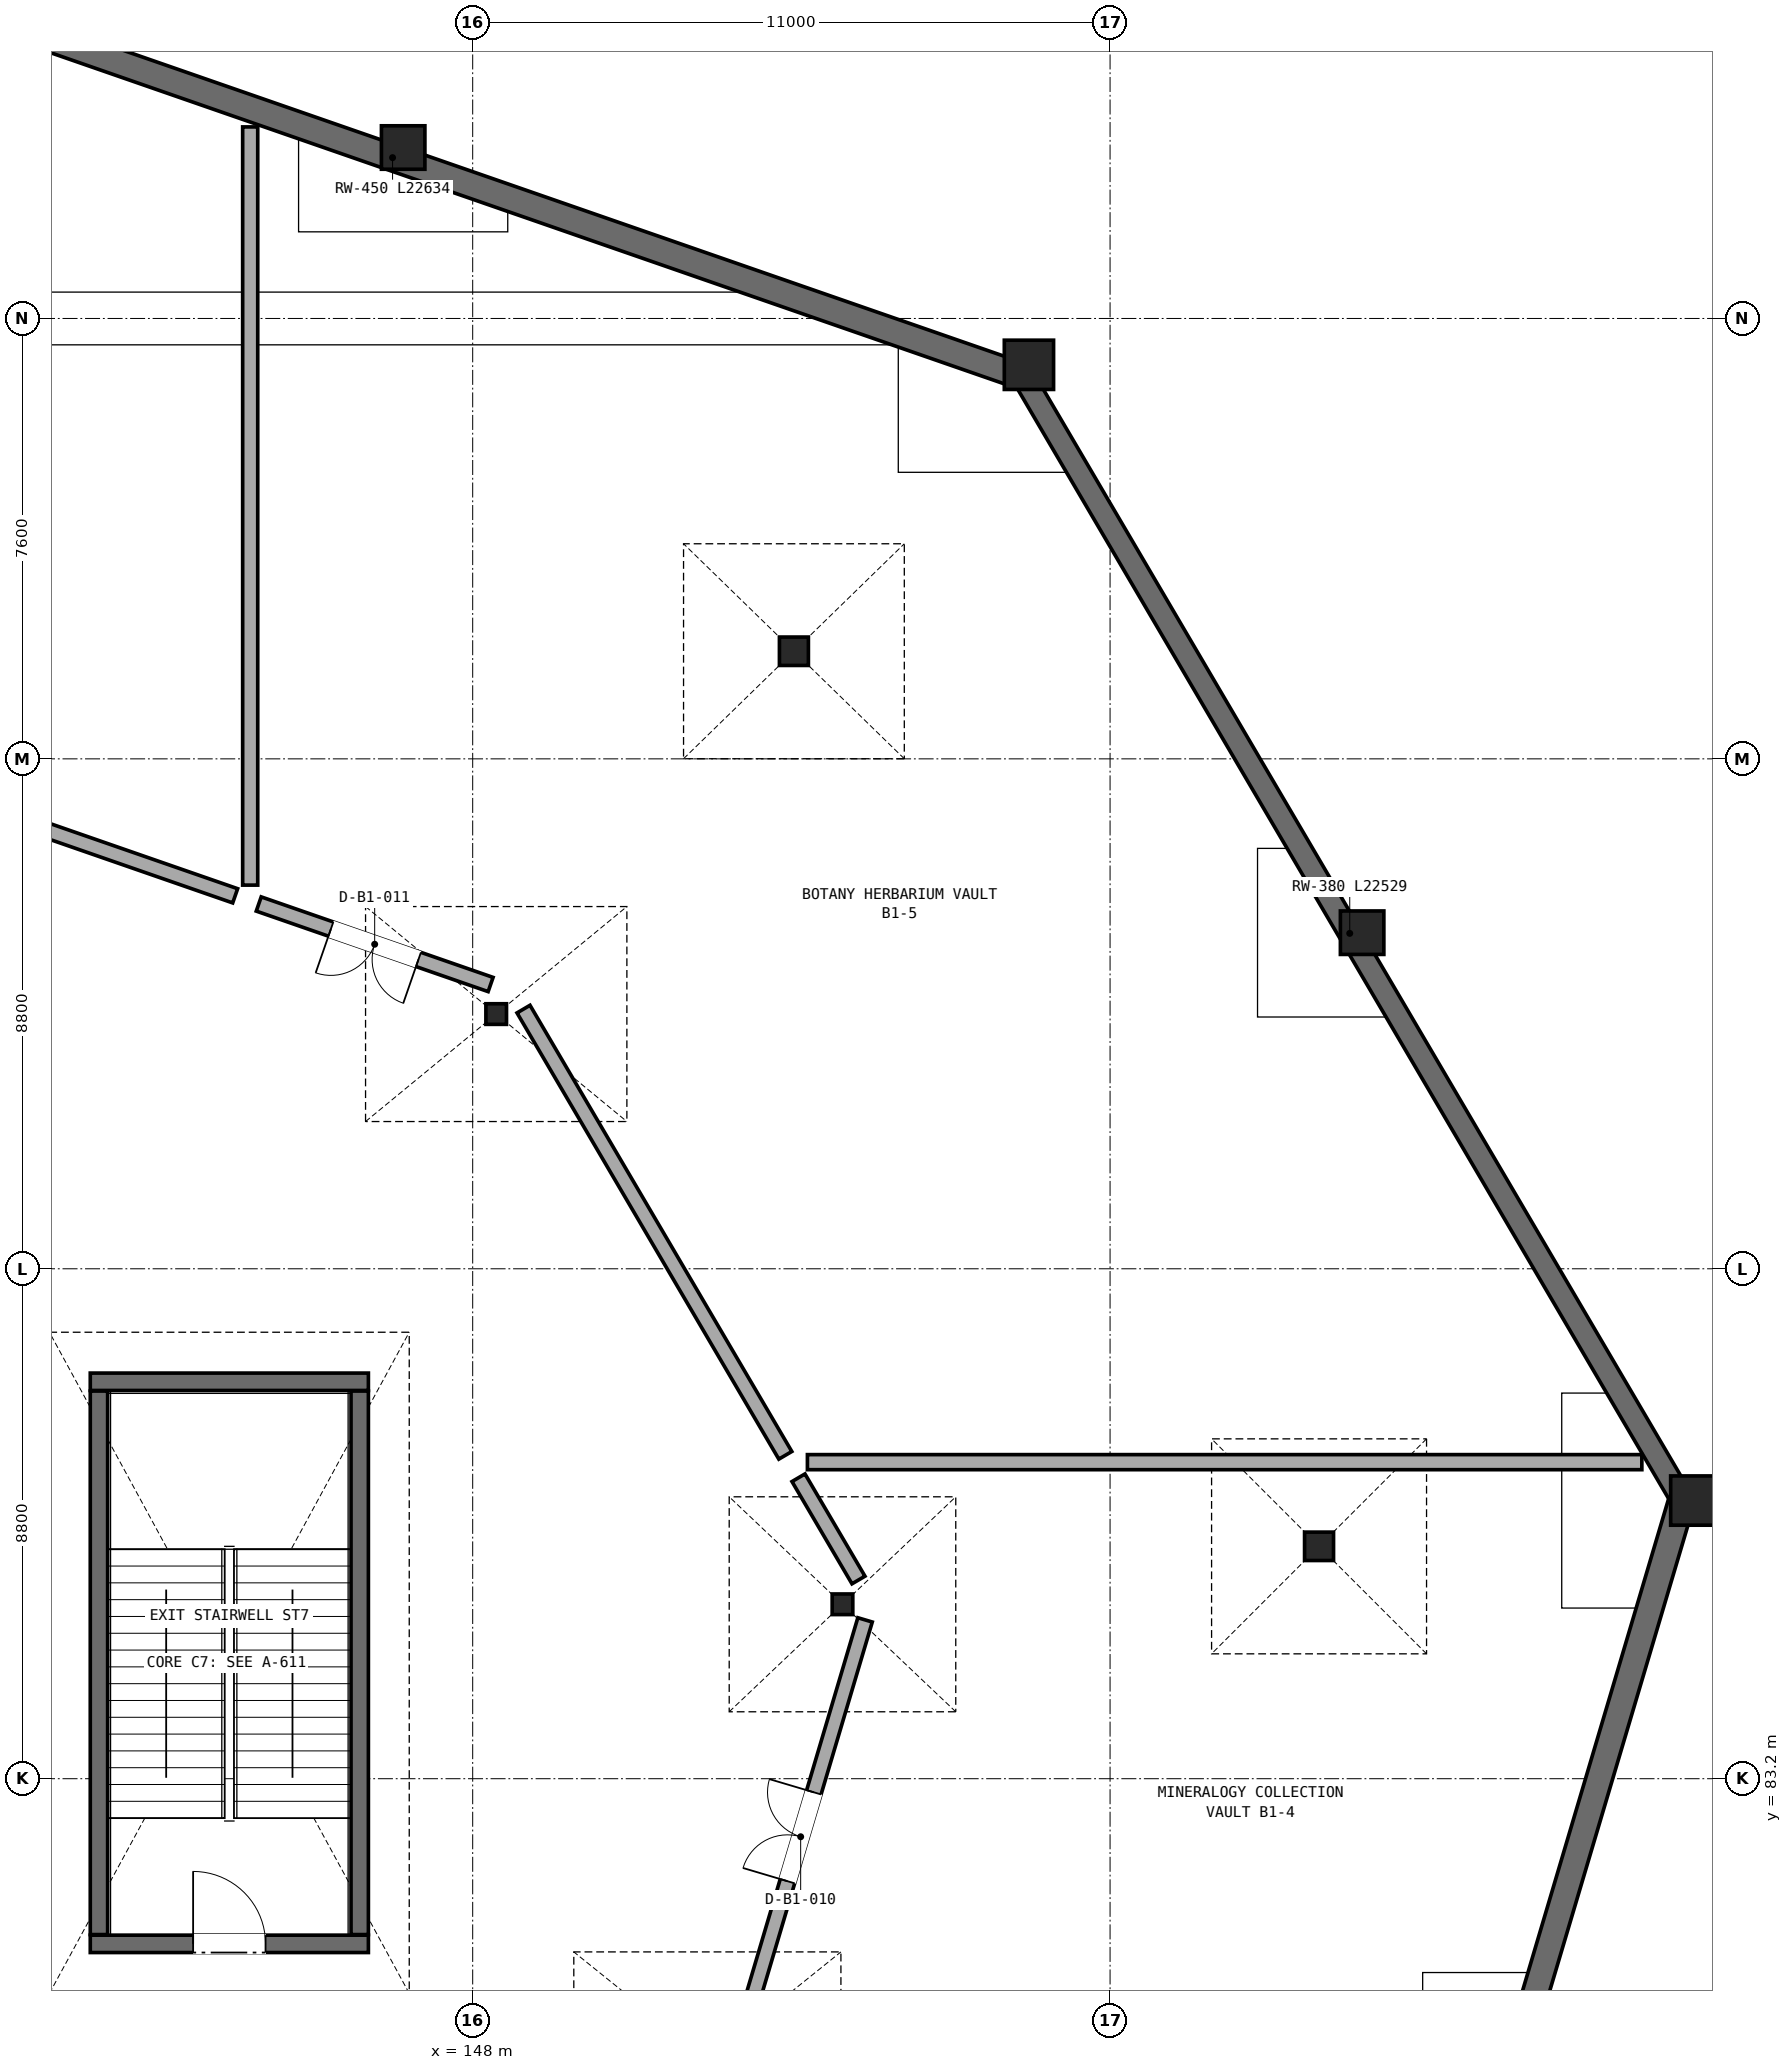
"""IFC4 building model, lengths in metres.
Left out: names, types, materials, properties, quantities, classifications, styles, units other than length and angle.
Written with IfcOpenShell. Run it as: python <this file> out.ifc"""

import sys

from ifc_helpers import new_model, si_unit, direction, frame, frame_2d, origin, origin_2d, place, context, subcontext, project, spatial, rectangle, hollow_circle, i_section, extrude, element, fill, save


model = new_model("IFC4")
c1 = context("Model", 3, precision=1e-05, world=origin(), true_north=direction((0.0, 1.0)))
c2 = subcontext(c1, "Body", "Model", "MODEL_VIEW")
j1 = project(units=[si_unit("LENGTHUNIT", "METRE"), si_unit("PLANEANGLEUNIT", "RADIAN")], contexts=[c1])
p1 = place(None, origin())
s1 = spatial("IfcSite", under=j1, at=p1, CompositionType="ELEMENT")
p2 = place(p1, origin())
s2 = spatial("IfcBuilding", under=s1, at=p2, CompositionType="ELEMENT")
p3 = place(p2, frame((0.0, 0.0, -5.4)))
s3 = spatial("IfcBuildingStorey", under=s2, at=p3, CompositionType="ELEMENT", Elevation=-5.4)
p4 = place(p3, frame((169.1, 88.0, 0.0), z_axis=(0.0, 0.0, 1.0), x_axis=(1.0, 0.0, 0.0)))
e1 = element("IfcColumn", 1, at=p4, inside=s3, PredefinedType="COLUMN", context=c2, shape_type="SweptSolid", body=[
    extrude(rectangle(XDim=0.85, YDim=0.85, at=origin_2d()), origin(), (0.0, 0.0, 1.0), 5.4),
])
p5 = place(p3, frame((163.35, 97.8, 0.0), z_axis=(0.0, 0.0, 1.0), x_axis=(1.0, 0.0, 0.0)))
e2 = element("IfcColumn", 2, at=p5, inside=s3, PredefinedType="COLUMN", context=c2, shape_type="SweptSolid", body=[
    extrude(rectangle(XDim=0.75, YDim=0.75, at=origin_2d()), origin(), (0.0, 0.0, 1.0), 5.4),
])
p6 = place(p3, frame((162.607, 87.21, 0.0), z_axis=(0.0, 0.0, 1.0), x_axis=(1.0, 0.0, 0.0)))
e3 = element("IfcColumn", 3, at=p6, inside=s3, PredefinedType="COLUMN", context=c2, shape_type="SweptSolid", body=[
    extrude(i_section(OverallWidth=0.5, OverallDepth=0.49, WebThickness=0.028, FlangeThickness=0.04, at=origin_2d()), origin(), (0.0, 0.0, 1.0), 5.4),
])
p7 = place(p3, frame((154.382, 86.21, 0.0), z_axis=(0.0, 0.0, 1.0), x_axis=(1.0, 0.0, 0.0)))
e4 = element("IfcColumn", 4, at=p7, inside=s3, PredefinedType="COLUMN", context=c2, shape_type="SweptSolid", body=[
    extrude(hollow_circle(Radius=0.178, WallThickness=0.013, at=origin_2d()), origin(), (0.0, 0.0, 1.0), 5.4),
])
p8 = place(p3, frame((157.6, 107.6, 0.0), z_axis=(0.0, 0.0, 1.0), x_axis=(1.0, 0.0, 0.0)))
e5 = element("IfcColumn", 5, at=p8, inside=s3, PredefinedType="COLUMN", context=c2, shape_type="SweptSolid", body=[
    extrude(rectangle(XDim=0.85, YDim=0.85, at=origin_2d()), origin(), (0.0, 0.0, 1.0), 5.4),
])
p9 = place(p3, frame((146.8, 111.35, 0.0), z_axis=(0.0, 0.0, 1.0), x_axis=(1.0, 0.0, 0.0)))
e6 = element("IfcColumn", 6, at=p9, inside=s3, PredefinedType="COLUMN", context=c2, shape_type="SweptSolid", body=[
    extrude(rectangle(XDim=0.75, YDim=0.75, at=origin_2d()), origin(), (0.0, 0.0, 1.0), 5.4),
])
p10 = place(p3, frame((153.544, 102.657, 0.0), z_axis=(0.0, 0.0, 1.0), x_axis=(1.0, 0.0, 0.0)))
e7 = element("IfcColumn", 7, at=p10, inside=s3, PredefinedType="COLUMN", context=c2, shape_type="SweptSolid", body=[
    extrude(i_section(OverallWidth=0.5, OverallDepth=0.49, WebThickness=0.028, FlangeThickness=0.04, at=origin_2d()), origin(), (0.0, 0.0, 1.0), 5.4),
])
p11 = place(p3, frame((148.406, 96.396, 0.0), z_axis=(0.0, 0.0, 1.0), x_axis=(1.0, 0.0, 0.0)))
e8 = element("IfcColumn", 8, at=p11, inside=s3, PredefinedType="COLUMN", context=c2, shape_type="SweptSolid", body=[
    extrude(hollow_circle(Radius=0.178, WallThickness=0.013, at=origin_2d()), origin(), (0.0, 0.0, 1.0), 5.4),
])
p12 = place(p3, frame((163.25, 69.085, 0.0), z_axis=(0.0, 0.0, 1.0), x_axis=(0.284599705079, 0.958646445708, 0.0)))
e9 = element("IfcWall", 9, at=p12, inside=s3, PredefinedType="USERDEFINED", context=c2, shape_type="SweptSolid", body=[
    extrude(rectangle(XDim=19.797, YDim=0.45, at=frame_2d((9.898, 0.0))), origin(), (0.0, 0.0, 1.0), 5.06),
])
p13 = place(p3, frame((168.837, 88.073, 0.0), z_axis=(0.0, 0.0, 1.0), x_axis=(-0.50606126332, 0.862497534934, 0.0)))
e10 = element("IfcWall", 10, at=p13, inside=s3, PredefinedType="USERDEFINED", context=c2, shape_type="SweptSolid", body=[
    extrude(rectangle(XDim=22.529, YDim=0.38, at=frame_2d((11.264, 0.0))), origin(), (0.0, 0.0, 1.0), 5.06),
])
p14 = place(p3, frame((157.308, 107.463, 0.0), z_axis=(0.0, 0.0, 1.0), x_axis=(-0.94467273581, 0.328014362822, 0.0)))
e11 = element("IfcWall", 11, at=p14, inside=s3, PredefinedType="USERDEFINED", context=c2, shape_type="SweptSolid", body=[
    extrude(rectangle(XDim=22.634, YDim=0.45, at=frame_2d((11.317, 0.0))), origin(), (0.0, 0.0, 1.0), 5.06),
])
p15 = place(p3, frame((141.4, 80.35, 0.0), z_axis=(0.0, 0.0, 1.0), x_axis=(1.0, 0.0, 0.0)))
e12 = element("IfcWall", 12, at=p15, inside=s3, PredefinedType="SHEAR", context=c2, shape_type="SweptSolid", body=[
    extrude(rectangle(XDim=4.8, YDim=0.3, at=frame_2d((2.4, 0.0))), origin(), (0.0, 0.0, 1.0), 5.085),
])
p16 = place(p15, frame((1.775, 0.0, 0.0)))
e13 = element("IfcOpeningElement", 13, at=p16, cuts=e12, PredefinedType="OPENING", context=c2, shape_type="SweptSolid", body=[
    extrude(rectangle(XDim=1.25, YDim=2.2, at=frame_2d((0.625, 1.1))), frame((0.0, 0.16, 0.0), z_axis=(0.0, -1.0, 0.0), x_axis=(1.0, 0.0, 0.0)), (0.0, 0.0, 1.0), 0.32),
])
p17 = place(p3, frame((146.2, 90.05, 0.0), z_axis=(0.0, 0.0, 1.0), x_axis=(-1.0, 0.0, 0.0)))
e14 = element("IfcWall", 14, at=p17, inside=s3, PredefinedType="SHEAR", context=c2, shape_type="SweptSolid", body=[
    extrude(rectangle(XDim=4.8, YDim=0.3, at=frame_2d((2.4, 0.0))), origin(), (0.0, 0.0, 1.0), 5.085),
])
for number, where, z_axis, x_axis in (
    (15, (146.05, 80.51, 0.0), (0.0, 0.0, 1.0), (0.0, 1.0, 0.0)),
    (16, (141.55, 89.89, 0.0), (0.0, 0.0, 1.0), (0.0, -1.0, 0.0)),
):
    element("IfcWall", number, at=place(p3, frame(where, z_axis=z_axis, x_axis=x_axis)), inside=s3, PredefinedType="SHEAR", context=c2, shape_type="SweptSolid", body=[
        extrude(rectangle(XDim=9.38, YDim=0.3, at=frame_2d((4.69, 0.0))), origin(), (0.0, 0.0, 1.0), 5.085),
    ])
p18 = place(p3, frame((143.901, 98.437, 0.0), z_axis=(0.0, 0.0, 1.0), x_axis=(-0.944669438021, 0.328023860214, 0.0)))
e17 = element("IfcWall", 17, at=p18, inside=s3, PredefinedType="SOLIDWALL", context=c2, shape_type="SweptSolid", body=[
    extrude(rectangle(XDim=5.967, YDim=0.26, at=frame_2d((2.983, 0.0))), origin(), (0.0, 0.0, 1.0), 5.03),
])
p19 = place(p3, frame((152.549, 78.456, 0.0), z_axis=(0.0, 0.0, 1.0), x_axis=(0.284584370511, 0.958650998049, 0.0)))
e18 = element("IfcWall", 18, at=p19, inside=s3, PredefinedType="SOLIDWALL", context=c2, shape_type="SweptSolid", body=[
    extrude(rectangle(XDim=7.808, YDim=0.26, at=frame_2d((3.904, 0.0))), origin(), (0.0, 0.0, 1.0), 4.26),
])
p20 = place(p19, frame((3.104, 0.0, 0.0)))
e19 = element("IfcOpeningElement", 19, at=p20, cuts=e18, PredefinedType="OPENING", context=c2, shape_type="SweptSolid", body=[
    extrude(rectangle(XDim=1.6, YDim=2.4, at=frame_2d((0.8, 1.2))), frame((0.0, 0.14, 0.0), z_axis=(0.0, -1.0, 0.0), x_axis=(1.0, 0.0, 0.0)), (0.0, 0.0, 1.0), 0.28),
])
p21 = place(p3, frame((154.658, 86.629, 0.0), z_axis=(0.0, 0.0, 1.0), x_axis=(-0.506013427862, 0.862525600097, 0.0)))
e20 = element("IfcWall", 20, at=p21, inside=s3, PredefinedType="SOLIDWALL", context=c2, shape_type="SweptSolid", body=[
    extrude(rectangle(XDim=2.046, YDim=0.26, at=frame_2d((1.023, 0.0))), origin(), (0.0, 0.0, 1.0), 5.03),
])
p22 = place(p3, frame((148.309, 96.906, 0.0), z_axis=(0.0, 0.0, 1.0), x_axis=(-0.944667711612, 0.328028832022, 0.0)))
e21 = element("IfcWall", 21, at=p22, inside=s3, PredefinedType="SOLIDWALL", context=c2, shape_type="SweptSolid", body=[
    extrude(rectangle(XDim=4.236, YDim=0.26, at=frame_2d((2.118, 0.0))), origin(), (0.0, 0.0, 1.0), 5.03),
])
p23 = place(p22, frame((1.318, 0.0, 0.0)))
e22 = element("IfcOpeningElement", 22, at=p23, cuts=e21, PredefinedType="OPENING", context=c2, shape_type="SweptSolid", body=[
    extrude(rectangle(XDim=1.6, YDim=2.4, at=frame_2d((0.8, 1.2))), frame((0.0, 0.14, 0.0), z_axis=(0.0, -1.0, 0.0), x_axis=(1.0, 0.0, 0.0)), (0.0, 0.0, 1.0), 0.28),
])
p24 = place(p3, frame((153.396, 88.781, 0.0), z_axis=(0.0, 0.0, 1.0), x_axis=(-0.506050684721, 0.862503741727, 0.0)))
e23 = element("IfcWall", 23, at=p24, inside=s3, PredefinedType="SOLIDWALL", context=c2, shape_type="SweptSolid", body=[
    extrude(rectangle(XDim=8.928, YDim=0.26, at=frame_2d((4.464, 0.0))), origin(), (0.0, 0.0, 1.0), 4.26),
])
p25 = place(p3, frame((144.16, 111.706, 0.0), z_axis=(0.0, 0.0, 1.0), x_axis=(0.0, -1.0, 0.0)))
e24 = element("IfcWall", 24, at=p25, inside=s3, PredefinedType="SOLIDWALL", context=c2, shape_type="SweptSolid", body=[
    extrude(rectangle(XDim=13.084, YDim=0.26, at=frame_2d((6.542, 0.0))), origin(), (0.0, 0.0, 1.0), 4.36),
])
p26 = place(p3, frame((153.777, 88.663, 0.0), z_axis=(0.0, 0.0, 1.0), x_axis=(1.0, 0.0, 0.0)))
e25 = element("IfcWall", 25, at=p26, inside=s3, PredefinedType="SOLIDWALL", context=c2, shape_type="SweptSolid", body=[
    extrude(rectangle(XDim=14.401, YDim=0.26, at=frame_2d((7.2, 0.0))), origin(), (0.0, 0.0, 1.0), 4.36),
])
p27 = place(p16, origin())
e26 = element("IfcDoor", 26, at=p27, inside=s3, OperationType="SINGLE_SWING_LEFT", PredefinedType="DOOR", context=c2, shape_type="SweptSolid", body=[
    extrude(rectangle(XDim=1.25, YDim=2.2, at=frame_2d((0.625, 1.1))), frame((0.0, 0.025, 0.0), z_axis=(0.0, -1.0, 0.0), x_axis=(1.0, 0.0, 0.0)), (0.0, 0.0, 1.0), 0.05),
])
fill(e13, e26)
p28 = place(p20, origin())
e27 = element("IfcDoor", 27, at=p28, inside=s3, OperationType="DOUBLE_DOOR_SINGLE_SWING", PredefinedType="DOOR", context=c2, shape_type="SweptSolid", body=[
    extrude(rectangle(XDim=1.6, YDim=2.4, at=frame_2d((0.8, 1.2))), frame((0.0, 0.025, 0.0), z_axis=(0.0, -1.0, 0.0), x_axis=(1.0, 0.0, 0.0)), (0.0, 0.0, 1.0), 0.05),
])
fill(e19, e27)
p29 = place(p23, origin())
e28 = element("IfcDoor", 28, at=p29, inside=s3, OperationType="DOUBLE_DOOR_SINGLE_SWING", PredefinedType="DOOR", context=c2, shape_type="SweptSolid", body=[
    extrude(rectangle(XDim=1.6, YDim=2.4, at=frame_2d((0.8, 1.2))), frame((0.0, 0.025, 0.0), z_axis=(0.0, -1.0, 0.0), x_axis=(1.0, 0.0, 0.0)), (0.0, 0.0, 1.0), 0.05),
])
fill(e22, e28)
save(model, sys.argv[1])
